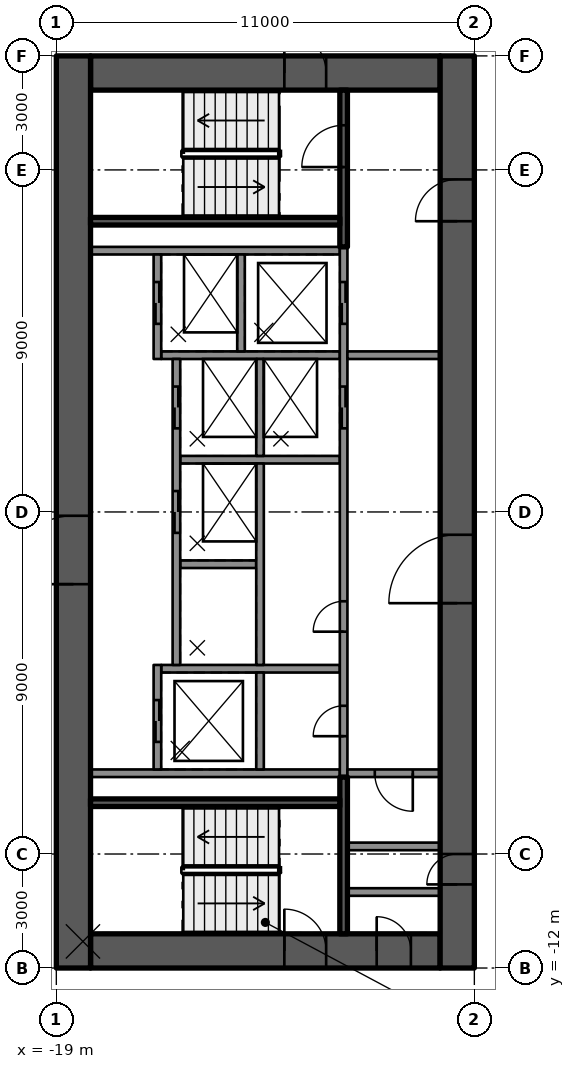
"""IFC4 building model, lengths in metres.
Left out: names, types, materials, properties, quantities, classifications, styles, units other than length and angle.
Written with IfcOpenShell. Run it as: python <this file> out.ifc"""

import sys

from ifc_helpers import new_model, si_unit, direction, frame, frame_2d, origin, place, context, subcontext, project, spatial, rectangle, extrude, element, fill, save


model = new_model("IFC4")
c1 = context("Model", 3, precision=1e-05, world=origin(), true_north=direction((0.0, 1.0)))
c2 = subcontext(c1, "Body", "Model", "MODEL_VIEW")
j1 = project(units=[si_unit("LENGTHUNIT", "METRE"), si_unit("PLANEANGLEUNIT", "RADIAN")], contexts=[c1])
p1 = place(None, origin())
s1 = spatial("IfcSite", under=j1, at=p1, CompositionType="ELEMENT")
p2 = place(p1, origin())
s2 = spatial("IfcBuilding", under=s1, at=p2, CompositionType="ELEMENT")
p3 = place(p2, frame((0.0, 0.0, 156.1)))
s3 = spatial("IfcBuildingStorey", under=s2, at=p3, CompositionType="ELEMENT", Elevation=156.1)
p4 = place(p3, frame((-18.1, 11.55, 0.0), z_axis=(0.0, 0.0, 1.0), x_axis=(1.0, 0.0, 0.0)))
e1 = element("IfcWall", 1, at=p4, inside=s3, PredefinedType="SHEAR", context=c2, shape_type="SweptSolid", body=[
    extrude(rectangle(XDim=9.2, YDim=0.9, at=frame_2d((4.6, 0.0))), origin(), (0.0, 0.0, 1.0), 3.5),
])
p5 = place(p4, frame((5.1, 0.0, 0.0)))
e2 = element("IfcOpeningElement", 2, at=p5, cuts=e1, PredefinedType="OPENING", context=c2, shape_type="SweptSolid", body=[
    extrude(rectangle(XDim=1.1, YDim=2.1, at=frame_2d((0.55, 1.05))), frame((0.0, 0.46, 0.0), z_axis=(0.0, -1.0, 0.0), x_axis=(1.0, 0.0, 0.0)), (0.0, 0.0, 1.0), 0.92),
])
p6 = place(p3, frame((-18.1, -11.55, 0.0), z_axis=(0.0, 0.0, 1.0), x_axis=(1.0, 0.0, 0.0)))
e3 = element("IfcWall", 3, at=p6, inside=s3, PredefinedType="SHEAR", context=c2, shape_type="SweptSolid", body=[
    extrude(rectangle(XDim=9.2, YDim=0.9, at=frame_2d((4.6, 0.0))), origin(), (0.0, 0.0, 1.0), 3.5),
])
p7 = place(p6, frame((5.1, 0.0, 0.0)))
e4 = element("IfcOpeningElement", 4, at=p7, cuts=e3, PredefinedType="OPENING", context=c2, shape_type="SweptSolid", body=[
    extrude(rectangle(XDim=1.1, YDim=2.1, at=frame_2d((0.55, 1.05))), frame((0.0, 0.46, 0.0), z_axis=(0.0, -1.0, 0.0), x_axis=(1.0, 0.0, 0.0)), (0.0, 0.0, 1.0), 0.92),
])
p8 = place(p6, frame((7.53, 0.0, 0.0)))
e5 = element("IfcOpeningElement", 5, at=p8, cuts=e3, PredefinedType="OPENING", context=c2, shape_type="SweptSolid", body=[
    extrude(rectangle(XDim=0.9, YDim=2.1, at=frame_2d((0.45, 1.05))), frame((0.0, 0.46, 0.0), z_axis=(0.0, -1.0, 0.0), x_axis=(1.0, 0.0, 0.0)), (0.0, 0.0, 1.0), 0.92),
])
p9 = place(p3, frame((-18.55, -12.0, 0.0), z_axis=(0.0, 0.0, 1.0), x_axis=(0.0, 1.0, 0.0)))
e6 = element("IfcWall", 6, at=p9, inside=s3, PredefinedType="SHEAR", context=c2, shape_type="SweptSolid", body=[
    extrude(rectangle(XDim=24.0, YDim=0.9, at=frame_2d((12.0, 0.0))), origin(), (0.0, 0.0, 1.0), 3.5),
])
p10 = place(p9, frame((10.1, 0.0, 0.0)))
e7 = element("IfcOpeningElement", 7, at=p10, cuts=e6, PredefinedType="OPENING", context=c2, shape_type="SweptSolid", body=[
    extrude(rectangle(XDim=1.8, YDim=2.1, at=frame_2d((0.9, 1.05))), frame((0.0, 0.46, 0.0), z_axis=(0.0, -1.0, 0.0), x_axis=(1.0, 0.0, 0.0)), (0.0, 0.0, 1.0), 0.92),
])
p11 = place(p3, frame((-8.45, -12.0, 0.0), z_axis=(0.0, 0.0, 1.0), x_axis=(0.0, 1.0, 0.0)))
e8 = element("IfcWall", 8, at=p11, inside=s3, PredefinedType="SHEAR", context=c2, shape_type="SweptSolid", body=[
    extrude(rectangle(XDim=24.0, YDim=0.9, at=frame_2d((12.0, 0.0))), origin(), (0.0, 0.0, 1.0), 3.5),
])
p12 = place(p11, frame((9.6, 0.0, 0.0)))
e9 = element("IfcOpeningElement", 9, at=p12, cuts=e8, PredefinedType="OPENING", context=c2, shape_type="SweptSolid", body=[
    extrude(rectangle(XDim=1.8, YDim=2.1, at=frame_2d((0.9, 1.05))), frame((0.0, 0.46, 0.0), z_axis=(0.0, -1.0, 0.0), x_axis=(1.0, 0.0, 0.0)), (0.0, 0.0, 1.0), 0.92),
])
p13 = place(p11, frame((19.65, 0.0, 0.0)))
e10 = element("IfcOpeningElement", 10, at=p13, cuts=e8, PredefinedType="OPENING", context=c2, shape_type="SweptSolid", body=[
    extrude(rectangle(XDim=1.1, YDim=2.1, at=frame_2d((0.55, 1.05))), frame((0.0, 0.46, 0.0), z_axis=(0.0, -1.0, 0.0), x_axis=(1.0, 0.0, 0.0)), (0.0, 0.0, 1.0), 0.92),
])
p14 = place(p11, frame((2.2, 0.0, 0.0)))
e11 = element("IfcOpeningElement", 11, at=p14, cuts=e8, PredefinedType="OPENING", context=c2, shape_type="SweptSolid", body=[
    extrude(rectangle(XDim=0.8, YDim=2.1, at=frame_2d((0.4, 1.05))), frame((0.0, 0.46, 0.0), z_axis=(0.0, -1.0, 0.0), x_axis=(1.0, 0.0, 0.0)), (0.0, 0.0, 1.0), 0.92),
])
for number, where, z_axis, x_axis in (
    (12, (-11.54, 6.875, 0.0), (0.0, 0.0, 1.0), (-1.0, 0.0, 0.0)),
    (13, (-11.54, -6.875, 0.0), (0.0, 0.0, 1.0), (-1.0, 0.0, 0.0)),
):
    element("IfcWall", number, at=place(p3, frame(where, z_axis=z_axis, x_axis=x_axis)), inside=s3, PredefinedType="SOLIDWALL", context=c2, shape_type="SweptSolid", body=[
        extrude(rectangle(XDim=6.56, YDim=0.2, at=frame_2d((3.28, 0.0))), origin(), (0.0, 0.0, 1.0), 3.09),
    ])
p15 = place(p3, frame((-11.54, -4.125, 0.0), z_axis=(0.0, 0.0, 1.0), x_axis=(-1.0, 0.0, 0.0)))
e14 = element("IfcWall", 14, at=p15, inside=s3, PredefinedType="SOLIDWALL", context=c2, shape_type="SweptSolid", body=[
    extrude(rectangle(XDim=4.7, YDim=0.2, at=frame_2d((2.35, 0.0))), origin(), (0.0, 0.0, 1.0), 3.09),
])
p16 = place(p3, frame((-13.74, -1.375, 0.0), z_axis=(0.0, 0.0, 1.0), x_axis=(-1.0, 0.0, 0.0)))
e15 = element("IfcWall", 15, at=p16, inside=s3, PredefinedType="SOLIDWALL", context=c2, shape_type="SweptSolid", body=[
    extrude(rectangle(XDim=2.0, YDim=0.2, at=frame_2d((1.0, 0.0))), origin(), (0.0, 0.0, 1.0), 3.09),
])
p17 = place(p3, frame((-11.54, 1.375, 0.0), z_axis=(0.0, 0.0, 1.0), x_axis=(-1.0, 0.0, 0.0)))
e16 = element("IfcWall", 16, at=p17, inside=s3, PredefinedType="SOLIDWALL", context=c2, shape_type="SweptSolid", body=[
    extrude(rectangle(XDim=4.2, YDim=0.2, at=frame_2d((2.1, 0.0))), origin(), (0.0, 0.0, 1.0), 3.09),
])
p18 = place(p3, frame((-11.54, 4.125, 0.0), z_axis=(0.0, 0.0, 1.0), x_axis=(-1.0, 0.0, 0.0)))
e17 = element("IfcWall", 17, at=p18, inside=s3, PredefinedType="SOLIDWALL", context=c2, shape_type="SweptSolid", body=[
    extrude(rectangle(XDim=4.7, YDim=0.2, at=frame_2d((2.35, 0.0))), origin(), (0.0, 0.0, 1.0), 3.09),
])
p19 = place(p3, frame((-11.44, -6.975, 0.0), z_axis=(0.0, 0.0, 1.0), x_axis=(0.0, 1.0, 0.0)))
e18 = element("IfcWall", 18, at=p19, inside=s3, PredefinedType="SOLIDWALL", context=c2, shape_type="SweptSolid", body=[
    extrude(rectangle(XDim=13.95, YDim=0.2, at=frame_2d((6.975, 0.0))), origin(), (0.0, 0.0, 1.0), 3.09),
])
p20 = place(p19, frame((9.175, 0.0, 0.0)))
e19 = element("IfcOpeningElement", 19, at=p20, cuts=e18, PredefinedType="OPENING", context=c2, shape_type="SweptSolid", body=[
    extrude(rectangle(XDim=1.1, YDim=2.1, at=frame_2d((0.55, 1.05))), frame((0.0, 0.11, 0.0), z_axis=(0.0, -1.0, 0.0), x_axis=(1.0, 0.0, 0.0)), (0.0, 0.0, 1.0), 0.22),
])
p21 = place(p19, frame((11.925, 0.0, 0.0)))
e20 = element("IfcOpeningElement", 20, at=p21, cuts=e18, PredefinedType="OPENING", context=c2, shape_type="SweptSolid", body=[
    extrude(rectangle(XDim=1.1, YDim=2.1, at=frame_2d((0.55, 1.05))), frame((0.0, 0.11, 0.0), z_axis=(0.0, -1.0, 0.0), x_axis=(1.0, 0.0, 0.0)), (0.0, 0.0, 1.0), 0.22),
])
p22 = place(p19, frame((1.075, 0.0, 0.0)))
e21 = element("IfcOpeningElement", 21, at=p22, cuts=e18, PredefinedType="OPENING", context=c2, shape_type="SweptSolid", body=[
    extrude(rectangle(XDim=0.8, YDim=2.1, at=frame_2d((0.4, 1.05))), frame((0.0, 0.11, 0.0), z_axis=(0.0, -1.0, 0.0), x_axis=(1.0, 0.0, 0.0)), (0.0, 0.0, 1.0), 0.22),
])
p23 = place(p19, frame((3.825, 0.0, 0.0)))
e22 = element("IfcOpeningElement", 22, at=p23, cuts=e18, PredefinedType="OPENING", context=c2, shape_type="SweptSolid", body=[
    extrude(rectangle(XDim=0.8, YDim=2.1, at=frame_2d((0.4, 1.05))), frame((0.0, 0.11, 0.0), z_axis=(0.0, -1.0, 0.0), x_axis=(1.0, 0.0, 0.0)), (0.0, 0.0, 1.0), 0.22),
])
p24 = place(p3, frame((-13.64, -6.775, 0.0), z_axis=(0.0, 0.0, 1.0), x_axis=(0.0, 1.0, 0.0)))
e23 = element("IfcWall", 23, at=p24, inside=s3, PredefinedType="SOLIDWALL", context=c2, shape_type="SweptSolid", body=[
    extrude(rectangle(XDim=2.55, YDim=0.2, at=frame_2d((1.275, 0.0))), origin(), (0.0, 0.0, 1.0), 3.09),
])
p25 = place(p3, frame((-13.64, -4.025, 0.0), z_axis=(0.0, 0.0, 1.0), x_axis=(0.0, 1.0, 0.0)))
e24 = element("IfcWall", 24, at=p25, inside=s3, PredefinedType="SOLIDWALL", context=c2, shape_type="SweptSolid", body=[
    extrude(rectangle(XDim=5.3, YDim=0.2, at=frame_2d((2.65, 0.0))), origin(), (0.0, 0.0, 1.0), 3.09),
])
for number, where, z_axis, x_axis in (
    (25, (-13.64, 1.475, 0.0), (0.0, 0.0, 1.0), (0.0, 1.0, 0.0)),
    (26, (-14.14, 4.225, 0.0), (0.0, 0.0, 1.0), (0.0, 1.0, 0.0)),
):
    element("IfcWall", number, at=place(p3, frame(where, z_axis=z_axis, x_axis=x_axis)), inside=s3, PredefinedType="SOLIDWALL", context=c2, shape_type="SweptSolid", body=[
        extrude(rectangle(XDim=2.55, YDim=0.2, at=frame_2d((1.275, 0.0))), origin(), (0.0, 0.0, 1.0), 3.09),
    ])
p26 = place(p3, frame((-16.34, -6.775, 0.0), z_axis=(0.0, 0.0, 1.0), x_axis=(0.0, 1.0, 0.0)))
e27 = element("IfcWall", 27, at=p26, inside=s3, PredefinedType="SOLIDWALL", context=c2, shape_type="SweptSolid", body=[
    extrude(rectangle(XDim=2.75, YDim=0.2, at=frame_2d((1.375, 0.0))), origin(), (0.0, 0.0, 1.0), 3.09),
])
p27 = place(p26, frame((0.725, 0.0, 0.0)))
e28 = element("IfcOpeningElement", 28, at=p27, cuts=e27, PredefinedType="OPENING", context=c2, shape_type="SweptSolid", body=[
    extrude(rectangle(XDim=1.1, YDim=2.1, at=frame_2d((0.55, 1.05))), frame((0.0, 0.11, 0.0), z_axis=(0.0, -1.0, 0.0), x_axis=(1.0, 0.0, 0.0)), (0.0, 0.0, 1.0), 0.22),
])
p28 = place(p3, frame((-15.84, -4.025, 0.0), z_axis=(0.0, 0.0, 1.0), x_axis=(0.0, 1.0, 0.0)))
e29 = element("IfcWall", 29, at=p28, inside=s3, PredefinedType="SOLIDWALL", context=c2, shape_type="SweptSolid", body=[
    extrude(rectangle(XDim=8.05, YDim=0.2, at=frame_2d((4.025, 0.0))), origin(), (0.0, 0.0, 1.0), 3.09),
])
p29 = place(p28, frame((3.475, 0.0, 0.0)))
e30 = element("IfcOpeningElement", 30, at=p29, cuts=e29, PredefinedType="OPENING", context=c2, shape_type="SweptSolid", body=[
    extrude(rectangle(XDim=1.1, YDim=2.1, at=frame_2d((0.55, 1.05))), frame((0.0, 0.11, 0.0), z_axis=(0.0, -1.0, 0.0), x_axis=(1.0, 0.0, 0.0)), (0.0, 0.0, 1.0), 0.22),
])
p30 = place(p28, frame((6.225, 0.0, 0.0)))
e31 = element("IfcOpeningElement", 31, at=p30, cuts=e29, PredefinedType="OPENING", context=c2, shape_type="SweptSolid", body=[
    extrude(rectangle(XDim=1.1, YDim=2.1, at=frame_2d((0.55, 1.05))), frame((0.0, 0.11, 0.0), z_axis=(0.0, -1.0, 0.0), x_axis=(1.0, 0.0, 0.0)), (0.0, 0.0, 1.0), 0.22),
])
p31 = place(p3, frame((-16.34, 4.025, 0.0), z_axis=(0.0, 0.0, 1.0), x_axis=(0.0, 1.0, 0.0)))
e32 = element("IfcWall", 32, at=p31, inside=s3, PredefinedType="SOLIDWALL", context=c2, shape_type="SweptSolid", body=[
    extrude(rectangle(XDim=2.75, YDim=0.2, at=frame_2d((1.375, 0.0))), origin(), (0.0, 0.0, 1.0), 3.09),
])
p32 = place(p31, frame((0.925, 0.0, 0.0)))
e33 = element("IfcOpeningElement", 33, at=p32, cuts=e32, PredefinedType="OPENING", context=c2, shape_type="SweptSolid", body=[
    extrude(rectangle(XDim=1.1, YDim=2.1, at=frame_2d((0.55, 1.05))), frame((0.0, 0.11, 0.0), z_axis=(0.0, -1.0, 0.0), x_axis=(1.0, 0.0, 0.0)), (0.0, 0.0, 1.0), 0.22),
])
p33 = place(p3, frame((-11.44, 6.975, 0.0), z_axis=(0.0, 0.0, 1.0), x_axis=(0.0, 1.0, 0.0)))
e34 = element("IfcWall", 34, at=p33, inside=s3, PredefinedType="SOLIDWALL", context=c2, shape_type="SweptSolid", body=[
    extrude(rectangle(XDim=4.125, YDim=0.2, at=frame_2d((2.062, 0.0))), origin(), (0.0, 0.0, 1.0), 3.09),
])
p34 = place(p33, frame((2.1, 0.0, 0.0)))
e35 = element("IfcOpeningElement", 35, at=p34, cuts=e34, PredefinedType="OPENING", context=c2, shape_type="SweptSolid", body=[
    extrude(rectangle(XDim=1.1, YDim=2.1, at=frame_2d((0.55, 1.05))), frame((0.0, 0.11, 0.0), z_axis=(0.0, -1.0, 0.0), x_axis=(1.0, 0.0, 0.0)), (0.0, 0.0, 1.0), 0.22),
])
p35 = place(p3, frame((-11.54, 7.65, 0.0), z_axis=(0.0, 0.0, 1.0), x_axis=(-1.0, 0.0, 0.0)))
e36 = element("IfcWall", 36, at=p35, inside=s3, PredefinedType="SOLIDWALL", context=c2, shape_type="SweptSolid", body=[
    extrude(rectangle(XDim=6.56, YDim=0.2, at=frame_2d((3.28, 0.0))), origin(), (0.0, 0.0, 1.0), 3.09),
])
p36 = place(p3, frame((-11.44, -11.1, 0.0), z_axis=(0.0, 0.0, 1.0), x_axis=(0.0, 1.0, 0.0)))
e37 = element("IfcWall", 37, at=p36, inside=s3, PredefinedType="SOLIDWALL", context=c2, shape_type="SweptSolid", body=[
    extrude(rectangle(XDim=4.125, YDim=0.2, at=frame_2d((2.062, 0.0))), origin(), (0.0, 0.0, 1.0), 3.09),
])
p37 = place(p3, frame((-11.54, -7.65, 0.0), z_axis=(0.0, 0.0, 1.0), x_axis=(-1.0, 0.0, 0.0)))
e38 = element("IfcWall", 38, at=p37, inside=s3, PredefinedType="SOLIDWALL", context=c2, shape_type="SweptSolid", body=[
    extrude(rectangle(XDim=6.56, YDim=0.2, at=frame_2d((3.28, 0.0))), origin(), (0.0, 0.0, 1.0), 3.09),
])
p38 = place(p3, frame((-8.9, 4.125, 0.0), z_axis=(0.0, 0.0, 1.0), x_axis=(-1.0, 0.0, 0.0)))
e39 = element("IfcWall", 39, at=p38, inside=s3, PredefinedType="PARTITIONING", context=c2, shape_type="SweptSolid", body=[
    extrude(rectangle(XDim=2.44, YDim=0.2, at=frame_2d((1.22, 0.0))), origin(), (0.0, 0.0, 1.0), 3.09),
])
p39 = place(p3, frame((-8.9, -6.875, 0.0), z_axis=(0.0, 0.0, 1.0), x_axis=(-1.0, 0.0, 0.0)))
e40 = element("IfcWall", 40, at=p39, inside=s3, PredefinedType="PARTITIONING", context=c2, shape_type="SweptSolid", body=[
    extrude(rectangle(XDim=2.44, YDim=0.2, at=frame_2d((1.22, 0.0))), origin(), (0.0, 0.0, 1.0), 3.09),
])
p40 = place(p39, frame((0.72, 0.0, 0.0)))
e41 = element("IfcOpeningElement", 41, at=p40, cuts=e40, PredefinedType="OPENING", context=c2, shape_type="SweptSolid", body=[
    extrude(rectangle(XDim=1.0, YDim=2.1, at=frame_2d((0.5, 1.05))), frame((0.0, 0.11, 0.0), z_axis=(0.0, -1.0, 0.0), x_axis=(1.0, 0.0, 0.0)), (0.0, 0.0, 1.0), 0.22),
])
for number, where, z_axis, x_axis in (
    (42, (-8.9, -10.0, 0.0), (0.0, 0.0, 1.0), (-1.0, 0.0, 0.0)),
    (43, (-8.9, -8.8, 0.0), (0.0, 0.0, 1.0), (-1.0, 0.0, 0.0)),
):
    element("IfcWall", number, at=place(p3, frame(where, z_axis=z_axis, x_axis=x_axis)), inside=s3, PredefinedType="PARTITIONING", context=c2, shape_type="SweptSolid", body=[
        extrude(rectangle(XDim=2.44, YDim=0.2, at=frame_2d((1.22, 0.0))), origin(), (0.0, 0.0, 1.0), 3.09),
    ])
p41 = place(p27, origin())
e44 = element("IfcDoor", 44, at=p41, inside=s3, OperationType="DOUBLE_DOOR_SLIDING", PredefinedType="DOOR", context=c2, shape_type="SweptSolid", body=[
    extrude(rectangle(XDim=1.1, YDim=2.1, at=frame_2d((0.55, 1.05))), frame((0.0, 0.025, 0.0), z_axis=(0.0, -1.0, 0.0), x_axis=(1.0, 0.0, 0.0)), (0.0, 0.0, 1.0), 0.05),
])
fill(e28, e44)
p42 = place(p29, origin())
e45 = element("IfcDoor", 45, at=p42, inside=s3, OperationType="DOUBLE_DOOR_SLIDING", PredefinedType="DOOR", context=c2, shape_type="SweptSolid", body=[
    extrude(rectangle(XDim=1.1, YDim=2.1, at=frame_2d((0.55, 1.05))), frame((0.0, 0.025, 0.0), z_axis=(0.0, -1.0, 0.0), x_axis=(1.0, 0.0, 0.0)), (0.0, 0.0, 1.0), 0.05),
])
fill(e30, e45)
p43 = place(p20, origin())
e46 = element("IfcDoor", 46, at=p43, inside=s3, OperationType="DOUBLE_DOOR_SLIDING", PredefinedType="DOOR", context=c2, shape_type="SweptSolid", body=[
    extrude(rectangle(XDim=1.1, YDim=2.1, at=frame_2d((0.55, 1.05))), frame((0.0, 0.025, 0.0), z_axis=(0.0, -1.0, 0.0), x_axis=(1.0, 0.0, 0.0)), (0.0, 0.0, 1.0), 0.05),
])
fill(e19, e46)
p44 = place(p30, origin())
e47 = element("IfcDoor", 47, at=p44, inside=s3, OperationType="DOUBLE_DOOR_SLIDING", PredefinedType="DOOR", context=c2, shape_type="SweptSolid", body=[
    extrude(rectangle(XDim=1.1, YDim=2.1, at=frame_2d((0.55, 1.05))), frame((0.0, 0.025, 0.0), z_axis=(0.0, -1.0, 0.0), x_axis=(1.0, 0.0, 0.0)), (0.0, 0.0, 1.0), 0.05),
])
fill(e31, e47)
p45 = place(p21, origin())
e48 = element("IfcDoor", 48, at=p45, inside=s3, OperationType="DOUBLE_DOOR_SLIDING", PredefinedType="DOOR", context=c2, shape_type="SweptSolid", body=[
    extrude(rectangle(XDim=1.1, YDim=2.1, at=frame_2d((0.55, 1.05))), frame((0.0, 0.025, 0.0), z_axis=(0.0, -1.0, 0.0), x_axis=(1.0, 0.0, 0.0)), (0.0, 0.0, 1.0), 0.05),
])
fill(e20, e48)
p46 = place(p32, origin())
e49 = element("IfcDoor", 49, at=p46, inside=s3, OperationType="DOUBLE_DOOR_SLIDING", PredefinedType="DOOR", context=c2, shape_type="SweptSolid", body=[
    extrude(rectangle(XDim=1.1, YDim=2.1, at=frame_2d((0.55, 1.05))), frame((0.0, 0.025, 0.0), z_axis=(0.0, -1.0, 0.0), x_axis=(1.0, 0.0, 0.0)), (0.0, 0.0, 1.0), 0.05),
])
fill(e33, e49)
p47 = place(p22, origin())
e50 = element("IfcDoor", 50, at=p47, inside=s3, OperationType="SINGLE_SWING_LEFT", PredefinedType="DOOR", context=c2, shape_type="SweptSolid", body=[
    extrude(rectangle(XDim=0.8, YDim=2.1, at=frame_2d((0.4, 1.05))), frame((0.0, 0.025, 0.0), z_axis=(0.0, -1.0, 0.0), x_axis=(1.0, 0.0, 0.0)), (0.0, 0.0, 1.0), 0.05),
])
fill(e21, e50)
p48 = place(p23, origin())
e51 = element("IfcDoor", 51, at=p48, inside=s3, OperationType="SINGLE_SWING_LEFT", PredefinedType="DOOR", context=c2, shape_type="SweptSolid", body=[
    extrude(rectangle(XDim=0.8, YDim=2.1, at=frame_2d((0.4, 1.05))), frame((0.0, 0.025, 0.0), z_axis=(0.0, -1.0, 0.0), x_axis=(1.0, 0.0, 0.0)), (0.0, 0.0, 1.0), 0.05),
])
fill(e22, e51)
p49 = place(p12, origin())
e52 = element("IfcDoor", 52, at=p49, inside=s3, OperationType="SINGLE_SWING_LEFT", PredefinedType="DOOR", context=c2, shape_type="SweptSolid", body=[
    extrude(rectangle(XDim=1.8, YDim=2.1, at=frame_2d((0.9, 1.05))), frame((0.0, 0.025, 0.0), z_axis=(0.0, -1.0, 0.0), x_axis=(1.0, 0.0, 0.0)), (0.0, 0.0, 1.0), 0.05),
])
fill(e9, e52)
p50 = place(p10, origin())
e53 = element("IfcDoor", 53, at=p50, inside=s3, OperationType="SINGLE_SWING_LEFT", PredefinedType="DOOR", context=c2, shape_type="SweptSolid", body=[
    extrude(rectangle(XDim=1.8, YDim=2.1, at=frame_2d((0.9, 1.05))), frame((0.0, 0.025, 0.0), z_axis=(0.0, -1.0, 0.0), x_axis=(1.0, 0.0, 0.0)), (0.0, 0.0, 1.0), 0.05),
])
fill(e7, e53)
p51 = place(p13, origin())
e54 = element("IfcDoor", 54, at=p51, inside=s3, OperationType="SINGLE_SWING_RIGHT", PredefinedType="DOOR", context=c2, shape_type="SweptSolid", body=[
    extrude(rectangle(XDim=1.1, YDim=2.1, at=frame_2d((0.55, 1.05))), frame((0.0, 0.025, 0.0), z_axis=(0.0, -1.0, 0.0), x_axis=(1.0, 0.0, 0.0)), (0.0, 0.0, 1.0), 0.05),
])
fill(e10, e54)
p52 = place(p5, origin())
e55 = element("IfcDoor", 55, at=p52, inside=s3, OperationType="SINGLE_SWING_RIGHT", PredefinedType="DOOR", context=c2, shape_type="SweptSolid", body=[
    extrude(rectangle(XDim=1.1, YDim=2.1, at=frame_2d((0.55, 1.05))), frame((0.0, 0.025, 0.0), z_axis=(0.0, -1.0, 0.0), x_axis=(1.0, 0.0, 0.0)), (0.0, 0.0, 1.0), 0.05),
])
fill(e2, e55)
p53 = place(p7, origin())
e56 = element("IfcDoor", 56, at=p53, inside=s3, OperationType="SINGLE_SWING_RIGHT", PredefinedType="DOOR", context=c2, shape_type="SweptSolid", body=[
    extrude(rectangle(XDim=1.1, YDim=2.1, at=frame_2d((0.55, 1.05))), frame((0.0, 0.025, 0.0), z_axis=(0.0, -1.0, 0.0), x_axis=(1.0, 0.0, 0.0)), (0.0, 0.0, 1.0), 0.05),
])
fill(e4, e56)
p54 = place(p34, origin())
e57 = element("IfcDoor", 57, at=p54, inside=s3, OperationType="SINGLE_SWING_RIGHT", PredefinedType="DOOR", context=c2, shape_type="SweptSolid", body=[
    extrude(rectangle(XDim=1.1, YDim=2.1, at=frame_2d((0.55, 1.05))), frame((0.0, 0.025, 0.0), z_axis=(0.0, -1.0, 0.0), x_axis=(1.0, 0.0, 0.0)), (0.0, 0.0, 1.0), 0.05),
])
fill(e35, e57)
p55 = place(p8, origin())
e58 = element("IfcDoor", 58, at=p55, inside=s3, OperationType="SINGLE_SWING_RIGHT", PredefinedType="DOOR", context=c2, shape_type="SweptSolid", body=[
    extrude(rectangle(XDim=0.9, YDim=2.1, at=frame_2d((0.45, 1.05))), frame((0.0, 0.025, 0.0), z_axis=(0.0, -1.0, 0.0), x_axis=(1.0, 0.0, 0.0)), (0.0, 0.0, 1.0), 0.05),
])
fill(e5, e58)
p56 = place(p14, origin())
e59 = element("IfcDoor", 59, at=p56, inside=s3, OperationType="SINGLE_SWING_LEFT", PredefinedType="DOOR", context=c2, shape_type="SweptSolid", body=[
    extrude(rectangle(XDim=0.8, YDim=2.1, at=frame_2d((0.4, 1.05))), frame((0.0, 0.025, 0.0), z_axis=(0.0, -1.0, 0.0), x_axis=(1.0, 0.0, 0.0)), (0.0, 0.0, 1.0), 0.05),
])
fill(e11, e59)
p57 = place(p40, origin())
e60 = element("IfcDoor", 60, at=p57, inside=s3, OperationType="SINGLE_SWING_RIGHT", PredefinedType="DOOR", context=c2, shape_type="SweptSolid", body=[
    extrude(rectangle(XDim=1.0, YDim=2.1, at=frame_2d((0.5, 1.05))), frame((0.0, 0.025, 0.0), z_axis=(0.0, -1.0, 0.0), x_axis=(1.0, 0.0, 0.0)), (0.0, 0.0, 1.0), 0.05),
])
fill(e41, e60)
save(model, sys.argv[1])
